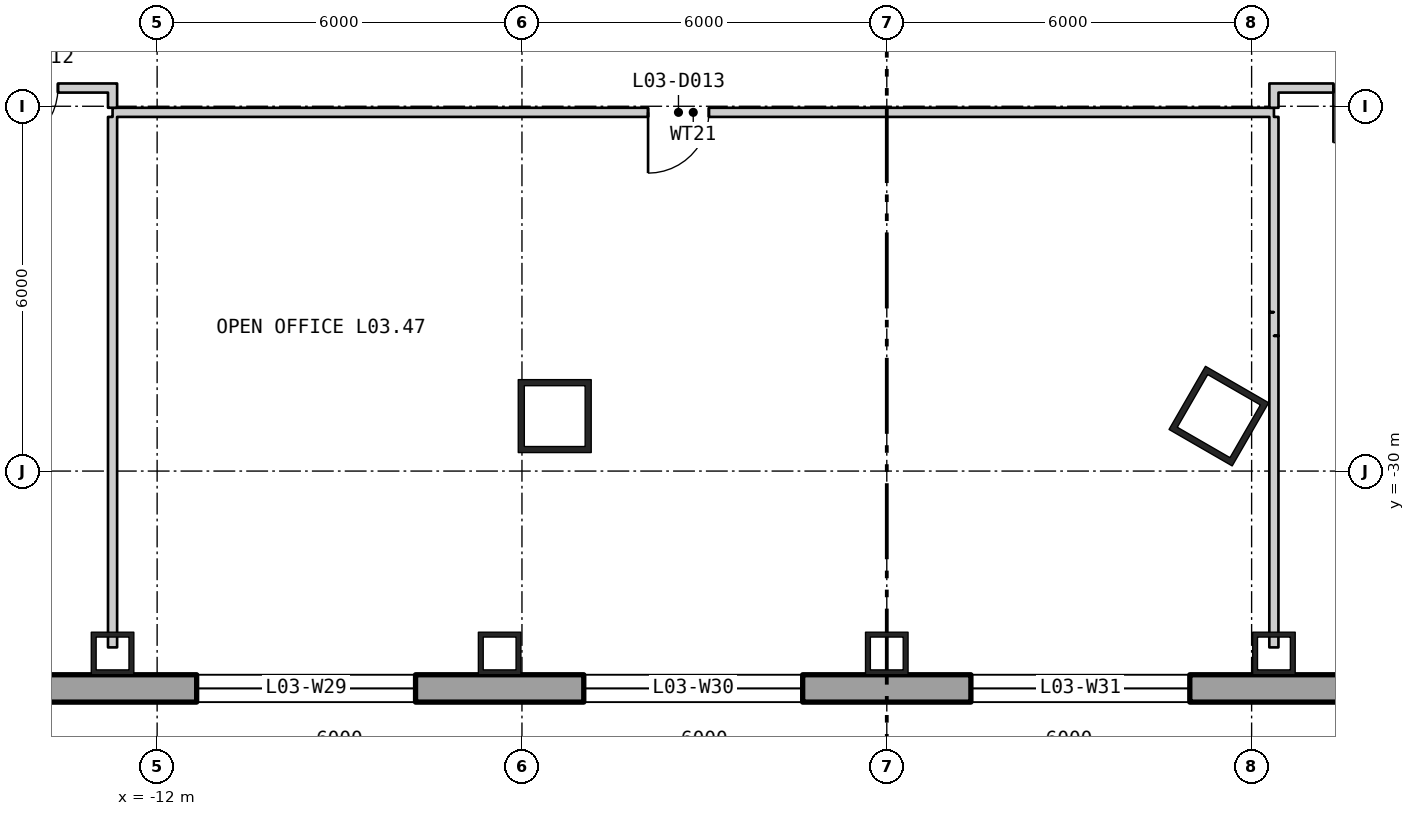
"""IFC4 building model, lengths in metres.
Left out: names, types, materials, properties, quantities, classifications, styles, units other than length and angle.
Written with IfcOpenShell. Run it as: python <this file> out.ifc"""

import sys

from ifc_helpers import new_model, si_unit, direction, frame, frame_2d, origin, origin_2d, place, context, subcontext, project, spatial, polyline, rectangle, hollow_rectangle, outline, extrude, element, fill, save


model = new_model("IFC4")
c1 = context("Model", 3, precision=1e-05, world=origin(), true_north=direction((0.0, 1.0)))
c2 = subcontext(c1, "Body", "Model", "MODEL_VIEW")
j1 = project(units=[si_unit("LENGTHUNIT", "METRE"), si_unit("PLANEANGLEUNIT", "RADIAN")], contexts=[c1])
p1 = place(None, origin())
s1 = spatial("IfcSite", under=j1, at=p1, CompositionType="ELEMENT")
p2 = place(p1, origin())
s2 = spatial("IfcBuilding", under=s1, at=p2, CompositionType="ELEMENT")
p3 = place(p2, frame((0.0, 0.0, 18.6)))
s3 = spatial("IfcBuildingStorey", under=s2, at=p3, CompositionType="ELEMENT", Elevation=18.6)
for number, where, z_axis, x_axis in (
    (1, (-5.461, -29.096, 0.0), (0.0, 0.0, 1.0), (1.0, 0.0, 0.0)),
    (2, (5.461, -29.096, 0.0), (0.0, 0.0, 1.0), (0.5, 0.866, 0.0)),
):
    element("IfcColumn", number, at=place(p3, frame(where, z_axis=z_axis, x_axis=x_axis)), inside=s3, PredefinedType="COLUMN", context=c2, shape_type="SweptSolid", body=[
        extrude(hollow_rectangle(XDim=1.2, YDim=1.2, WallThickness=0.1, at=origin_2d()), origin(), (0.0, 0.0, 1.0), 5.1),
    ])
for number, where, z_axis, x_axis in (
    (3, (-12.733, -33.0, 0.0), (0.0, 0.0, 1.0), (1.0, 0.0, 0.0)),
    (4, (-6.367, -33.0, 0.0), (0.0, 0.0, 1.0), (1.0, 0.0, 0.0)),
    (5, (0.0, -33.0, 0.0), (0.0, 0.0, 1.0), (1.0, 0.0, 0.0)),
    (6, (6.367, -33.0, 0.0), (0.0, 0.0, 1.0), (1.0, 0.0, 0.0)),
):
    element("IfcColumn", number, at=place(p3, frame(where, z_axis=z_axis, x_axis=x_axis)), inside=s3, PredefinedType="COLUMN", context=c2, shape_type="SweptSolid", body=[
        extrude(hollow_rectangle(XDim=0.7, YDim=0.7, WallThickness=0.08, at=origin_2d()), origin(), (0.0, 0.0, 1.0), 5.1),
    ])
p4 = place(p3, frame((-38.775, -33.575, -0.4), z_axis=(0.0, 0.0, 1.0), x_axis=(1.0, 0.0, 0.0)))
e7 = element("IfcWall", 7, at=p4, inside=s3, PredefinedType="SOLIDWALL", context=c2, shape_type="SweptSolid", body=[
    extrude(outline(polyline([(-0.225, -0.225), (77.775, -0.225), (77.325, 0.225), (0.225, 0.225), (-0.225, -0.225)])), origin(), (0.0, 0.0, 1.0), 5.1),
])
p5 = place(p4, frame((1.958, 0.0, 1.3)))
e8 = element("IfcOpeningElement", 8, at=p5, cuts=e7, PredefinedType="OPENING", context=c2, shape_type="SweptSolid", body=[
    extrude(rectangle(XDim=3.6, YDim=3.2, at=frame_2d((1.8, 1.6))), frame((0.0, 0.235, 0.0), z_axis=(0.0, -1.0, 0.0), x_axis=(1.0, 0.0, 0.0)), (0.0, 0.0, 1.0), 0.47),
])
p6 = place(p4, frame((8.325, 0.0, 1.3)))
e9 = element("IfcOpeningElement", 9, at=p6, cuts=e7, PredefinedType="OPENING", context=c2, shape_type="SweptSolid", body=[
    extrude(rectangle(XDim=3.6, YDim=3.2, at=frame_2d((1.8, 1.6))), frame((0.0, 0.235, 0.0), z_axis=(0.0, -1.0, 0.0), x_axis=(1.0, 0.0, 0.0)), (0.0, 0.0, 1.0), 0.47),
])
p7 = place(p4, frame((14.692, 0.0, 1.3)))
e10 = element("IfcOpeningElement", 10, at=p7, cuts=e7, PredefinedType="OPENING", context=c2, shape_type="SweptSolid", body=[
    extrude(rectangle(XDim=3.6, YDim=3.2, at=frame_2d((1.8, 1.6))), frame((0.0, 0.235, 0.0), z_axis=(0.0, -1.0, 0.0), x_axis=(1.0, 0.0, 0.0)), (0.0, 0.0, 1.0), 0.47),
])
p8 = place(p4, frame((21.325, 0.0, 1.3)))
e11 = element("IfcOpeningElement", 11, at=p8, cuts=e7, PredefinedType="OPENING", context=c2, shape_type="SweptSolid", body=[
    extrude(rectangle(XDim=3.6, YDim=3.2, at=frame_2d((1.8, 1.6))), frame((0.0, 0.235, 0.0), z_axis=(0.0, -1.0, 0.0), x_axis=(1.0, 0.0, 0.0)), (0.0, 0.0, 1.0), 0.47),
])
p9 = place(p4, frame((27.425, 0.0, 1.3)))
e12 = element("IfcOpeningElement", 12, at=p9, cuts=e7, PredefinedType="OPENING", context=c2, shape_type="SweptSolid", body=[
    extrude(rectangle(XDim=3.6, YDim=3.2, at=frame_2d((1.8, 1.6))), frame((0.0, 0.235, 0.0), z_axis=(0.0, -1.0, 0.0), x_axis=(1.0, 0.0, 0.0)), (0.0, 0.0, 1.0), 0.47),
])
p10 = place(p4, frame((33.792, 0.0, 1.3)))
e13 = element("IfcOpeningElement", 13, at=p10, cuts=e7, PredefinedType="OPENING", context=c2, shape_type="SweptSolid", body=[
    extrude(rectangle(XDim=3.6, YDim=3.2, at=frame_2d((1.8, 1.6))), frame((0.0, 0.235, 0.0), z_axis=(0.0, -1.0, 0.0), x_axis=(1.0, 0.0, 0.0)), (0.0, 0.0, 1.0), 0.47),
])
p11 = place(p4, frame((40.158, 0.0, 1.3)))
e14 = element("IfcOpeningElement", 14, at=p11, cuts=e7, PredefinedType="OPENING", context=c2, shape_type="SweptSolid", body=[
    extrude(rectangle(XDim=3.6, YDim=3.2, at=frame_2d((1.8, 1.6))), frame((0.0, 0.235, 0.0), z_axis=(0.0, -1.0, 0.0), x_axis=(1.0, 0.0, 0.0)), (0.0, 0.0, 1.0), 0.47),
])
p12 = place(p4, frame((46.525, 0.0, 1.3)))
e15 = element("IfcOpeningElement", 15, at=p12, cuts=e7, PredefinedType="OPENING", context=c2, shape_type="SweptSolid", body=[
    extrude(rectangle(XDim=3.6, YDim=3.2, at=frame_2d((1.8, 1.6))), frame((0.0, 0.235, 0.0), z_axis=(0.0, -1.0, 0.0), x_axis=(1.0, 0.0, 0.0)), (0.0, 0.0, 1.0), 0.47),
])
p13 = place(p4, frame((52.625, 0.0, 1.3)))
e16 = element("IfcOpeningElement", 16, at=p13, cuts=e7, PredefinedType="OPENING", context=c2, shape_type="SweptSolid", body=[
    extrude(rectangle(XDim=3.6, YDim=3.2, at=frame_2d((1.8, 1.6))), frame((0.0, 0.235, 0.0), z_axis=(0.0, -1.0, 0.0), x_axis=(1.0, 0.0, 0.0)), (0.0, 0.0, 1.0), 0.47),
])
p14 = place(p4, frame((59.258, 0.0, 1.3)))
e17 = element("IfcOpeningElement", 17, at=p14, cuts=e7, PredefinedType="OPENING", context=c2, shape_type="SweptSolid", body=[
    extrude(rectangle(XDim=3.6, YDim=3.2, at=frame_2d((1.8, 1.6))), frame((0.0, 0.235, 0.0), z_axis=(0.0, -1.0, 0.0), x_axis=(1.0, 0.0, 0.0)), (0.0, 0.0, 1.0), 0.47),
])
p15 = place(p4, frame((65.625, 0.0, 1.3)))
e18 = element("IfcOpeningElement", 18, at=p15, cuts=e7, PredefinedType="OPENING", context=c2, shape_type="SweptSolid", body=[
    extrude(rectangle(XDim=3.6, YDim=3.2, at=frame_2d((1.8, 1.6))), frame((0.0, 0.235, 0.0), z_axis=(0.0, -1.0, 0.0), x_axis=(1.0, 0.0, 0.0)), (0.0, 0.0, 1.0), 0.47),
])
p16 = place(p4, frame((71.992, 0.0, 1.3)))
e19 = element("IfcOpeningElement", 19, at=p16, cuts=e7, PredefinedType="OPENING", context=c2, shape_type="SweptSolid", body=[
    extrude(rectangle(XDim=3.6, YDim=3.2, at=frame_2d((1.8, 1.6))), frame((0.0, 0.235, 0.0), z_axis=(0.0, -1.0, 0.0), x_axis=(1.0, 0.0, 0.0)), (0.0, 0.0, 1.0), 0.47),
])
p17 = place(p3, frame((-15.35, -23.7, 0.0), z_axis=(0.0, 0.0, 1.0), x_axis=(1.0, 0.0, 0.0)))
e20 = element("IfcWall", 20, at=p17, inside=s3, PredefinedType="PARTITIONING", context=c2, shape_type="SweptSolid", body=[
    extrude(rectangle(XDim=2.542, YDim=0.15, at=frame_2d((1.271, 0.0))), origin(), (0.0, 0.0, 1.0), 4.88),
])
p18 = place(p17, frame((0.719, 0.0, 0.0)))
e21 = element("IfcOpeningElement", 21, at=p18, cuts=e20, PredefinedType="OPENING", context=c2, shape_type="SweptSolid", body=[
    extrude(rectangle(XDim=1.0, YDim=2.1, at=frame_2d((0.5, 1.05))), frame((0.0, 0.085, 0.0), z_axis=(0.0, -1.0, 0.0), x_axis=(1.0, 0.0, 0.0)), (0.0, 0.0, 1.0), 0.17),
])
p19 = place(p3, frame((-12.733, -32.9, 0.0), z_axis=(0.0, 0.0, 1.0), x_axis=(0.0, 1.0, 0.0)))
e22 = element("IfcWall", 22, at=p19, inside=s3, PredefinedType="PARTITIONING", context=c2, shape_type="SweptSolid", body=[
    extrude(rectangle(XDim=8.725, YDim=0.15, at=frame_2d((4.362, 0.0))), origin(), (0.0, 0.0, 1.0), 4.19),
])
p20 = place(p3, frame((-12.733, -24.1, 0.0), z_axis=(0.0, 0.0, 1.0), x_axis=(1.0, 0.0, 0.0)))
e23 = element("IfcWall", 23, at=p20, inside=s3, PredefinedType="PARTITIONING", context=c2, shape_type="SweptSolid", body=[
    extrude(rectangle(XDim=19.1, YDim=0.15, at=frame_2d((9.55, 0.0))), origin(), (0.0, 0.0, 1.0), 4.88),
])
p21 = place(p20, frame((8.807, 0.0, 0.0)))
e24 = element("IfcOpeningElement", 24, at=p21, cuts=e23, PredefinedType="OPENING", context=c2, shape_type="SweptSolid", body=[
    extrude(rectangle(XDim=1.0, YDim=2.1, at=frame_2d((0.5, 1.05))), frame((0.0, 0.085, 0.0), z_axis=(0.0, -1.0, 0.0), x_axis=(1.0, 0.0, 0.0)), (0.0, 0.0, 1.0), 0.17),
])
p22 = place(p3, frame((-12.733, -24.025, 0.0), z_axis=(0.0, 0.0, 1.0), x_axis=(0.0, 1.0, 0.0)))
e25 = element("IfcWall", 25, at=p22, inside=s3, PredefinedType="PARTITIONING", context=c2, shape_type="SweptSolid", body=[
    extrude(rectangle(XDim=0.4, YDim=0.15, at=frame_2d((0.2, 0.0))), origin(), (0.0, 0.0, 1.0), 4.88),
])
p23 = place(p3, frame((6.366, -32.9, 0.0), z_axis=(0.0, 0.0, 1.0), x_axis=(0.000117096018, 0.999999993144, 0.0)))
e26 = element("IfcWall", 26, at=p23, inside=s3, PredefinedType="PARTITIONING", context=c2, shape_type="SweptSolid", body=[
    extrude(rectangle(XDim=5.124, YDim=0.15, at=frame_2d((2.562, 0.0))), origin(), (0.0, 0.0, 1.0), 4.28),
])
p24 = place(p3, frame((6.367, -27.776, 0.0), z_axis=(0.0, 0.0, 1.0), x_axis=(0.0, 1.0, 0.0)))
e27 = element("IfcWall", 27, at=p24, inside=s3, PredefinedType="PARTITIONING", context=c2, shape_type="SweptSolid", body=[
    extrude(rectangle(XDim=0.39, YDim=0.15, at=frame_2d((0.195, 0.0))), origin(), (0.0, 0.0, 1.0), 4.88),
])
p25 = place(p3, frame((6.367, -27.386, 0.0), z_axis=(0.0, 0.0, 1.0), x_axis=(0.000124571784, 0.999999992241, 0.0)))
e28 = element("IfcWall", 28, at=p25, inside=s3, PredefinedType="PARTITIONING", context=c2, shape_type="SweptSolid", body=[
    extrude(rectangle(XDim=3.211, YDim=0.15, at=frame_2d((1.605, 0.0))), origin(), (0.0, 0.0, 1.0), 4.28),
])
p26 = place(p3, frame((6.367, -24.025, 0.0), z_axis=(0.0, 0.0, 1.0), x_axis=(0.0, 1.0, 0.0)))
e29 = element("IfcWall", 29, at=p26, inside=s3, PredefinedType="PARTITIONING", context=c2, shape_type="SweptSolid", body=[
    extrude(rectangle(XDim=0.4, YDim=0.15, at=frame_2d((0.2, 0.0))), origin(), (0.0, 0.0, 1.0), 4.88),
])
p27 = place(p3, frame((6.442, -23.7, 0.0), z_axis=(0.0, 0.0, 1.0), x_axis=(1.0, 0.0, 0.0)))
e30 = element("IfcWall", 30, at=p27, inside=s3, PredefinedType="PARTITIONING", context=c2, shape_type="SweptSolid", body=[
    extrude(rectangle(XDim=6.216, YDim=0.15, at=frame_2d((3.108, 0.0))), origin(), (0.0, 0.0, 1.0), 4.88),
])
p28 = place(p27, frame((0.903, 0.0, 0.0)))
e31 = element("IfcOpeningElement", 31, at=p28, cuts=e30, PredefinedType="OPENING", context=c2, shape_type="SweptSolid", body=[
    extrude(rectangle(XDim=1.8, YDim=2.1, at=frame_2d((0.9, 1.05))), frame((0.0, 0.085, 0.0), z_axis=(0.0, -1.0, 0.0), x_axis=(1.0, 0.0, 0.0)), (0.0, 0.0, 1.0), 0.17),
])
p29 = place(p9, origin())
e32 = element("IfcWindow", 32, at=p29, inside=s3, PartitioningType="SINGLE_PANEL", PredefinedType="WINDOW", context=c2, shape_type="SweptSolid", body=[
    extrude(rectangle(XDim=3.6, YDim=3.2, at=frame_2d((1.8, 1.6))), frame((0.0, 0.105, 0.0), z_axis=(0.0, -1.0, 0.0), x_axis=(1.0, 0.0, 0.0)), (0.0, 0.0, 1.0), 0.06),
])
fill(e12, e32)
p30 = place(p10, origin())
e33 = element("IfcWindow", 33, at=p30, inside=s3, PartitioningType="SINGLE_PANEL", PredefinedType="WINDOW", context=c2, shape_type="SweptSolid", body=[
    extrude(rectangle(XDim=3.6, YDim=3.2, at=frame_2d((1.8, 1.6))), frame((0.0, 0.105, 0.0), z_axis=(0.0, -1.0, 0.0), x_axis=(1.0, 0.0, 0.0)), (0.0, 0.0, 1.0), 0.06),
])
fill(e13, e33)
p31 = place(p11, origin())
e34 = element("IfcWindow", 34, at=p31, inside=s3, PartitioningType="SINGLE_PANEL", PredefinedType="WINDOW", context=c2, shape_type="SweptSolid", body=[
    extrude(rectangle(XDim=3.6, YDim=3.2, at=frame_2d((1.8, 1.6))), frame((0.0, 0.105, 0.0), z_axis=(0.0, -1.0, 0.0), x_axis=(1.0, 0.0, 0.0)), (0.0, 0.0, 1.0), 0.06),
])
fill(e14, e34)
p32 = place(p18, origin())
e35 = element("IfcDoor", 35, at=p32, inside=s3, OperationType="SINGLE_SWING_LEFT", PredefinedType="DOOR", context=c2, shape_type="SweptSolid", body=[
    extrude(rectangle(XDim=1.0, YDim=2.1, at=frame_2d((0.5, 1.05))), frame((0.0, 0.025, 0.0), z_axis=(0.0, -1.0, 0.0), x_axis=(1.0, 0.0, 0.0)), (0.0, 0.0, 1.0), 0.05),
])
fill(e21, e35)
p33 = place(p21, origin())
e36 = element("IfcDoor", 36, at=p33, inside=s3, OperationType="SINGLE_SWING_LEFT", PredefinedType="DOOR", context=c2, shape_type="SweptSolid", body=[
    extrude(rectangle(XDim=1.0, YDim=2.1, at=frame_2d((0.5, 1.05))), frame((0.0, 0.025, 0.0), z_axis=(0.0, -1.0, 0.0), x_axis=(1.0, 0.0, 0.0)), (0.0, 0.0, 1.0), 0.05),
])
fill(e24, e36)
p34 = place(p28, origin())
e37 = element("IfcDoor", 37, at=p34, inside=s3, OperationType="DOUBLE_DOOR_SINGLE_SWING", PredefinedType="DOOR", context=c2, shape_type="SweptSolid", body=[
    extrude(rectangle(XDim=1.8, YDim=2.1, at=frame_2d((0.9, 1.05))), frame((0.0, 0.025, 0.0), z_axis=(0.0, -1.0, 0.0), x_axis=(1.0, 0.0, 0.0)), (0.0, 0.0, 1.0), 0.05),
])
fill(e31, e37)
save(model, sys.argv[1])
